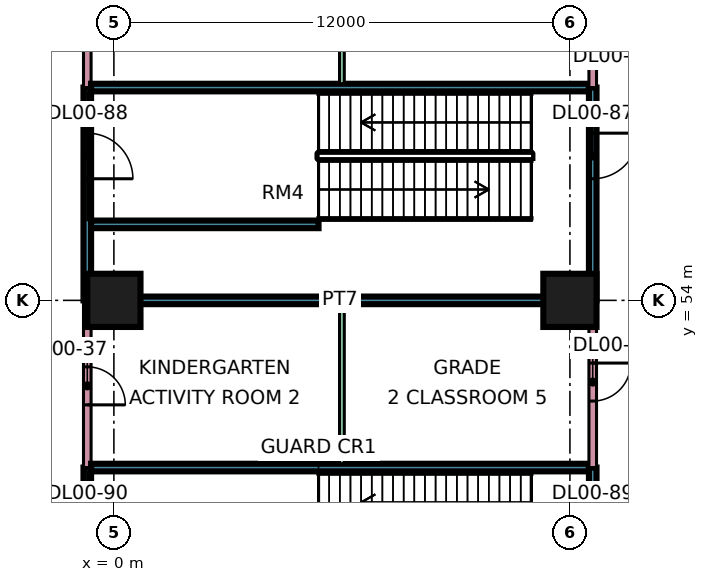
"""IFC4 building model, lengths in metres.
Left out: names, types, materials, properties, quantities, classifications, styles, units other than length and angle.
Written with IfcOpenShell. Run it as: python <this file> out.ifc"""

import sys

from ifc_helpers import new_model, si_unit, direction, frame, frame_2d, origin, origin_2d, place, context, subcontext, project, spatial, rectangle, extrude, element, fill, save


model = new_model("IFC4")
c1 = context("Model", 3, precision=1e-05, world=origin(), true_north=direction((0.0, 1.0)))
c2 = subcontext(c1, "Body", "Model", "MODEL_VIEW")
j1 = project(units=[si_unit("LENGTHUNIT", "METRE"), si_unit("PLANEANGLEUNIT", "RADIAN")], contexts=[c1])
p1 = place(None, origin())
s1 = spatial("IfcSite", under=j1, at=p1, CompositionType="ELEMENT")
p2 = place(p1, origin())
s2 = spatial("IfcBuilding", under=s1, at=p2, CompositionType="ELEMENT")
p3 = place(p2, origin())
s3 = spatial("IfcBuildingStorey", under=s2, at=p3, CompositionType="ELEMENT", Elevation=0.0)
for number, where, z_axis, x_axis in (
    (1, (0.0, 54.0, 0.0), (0.0, 0.0, 1.0), (1.0, 0.0, 0.0)),
    (2, (12.0, 54.0, 0.0), (0.0, 0.0, 1.0), (1.0, 0.0, 0.0)),
):
    element("IfcColumn", number, at=place(p3, frame(where, z_axis=z_axis, x_axis=x_axis)), inside=s3, PredefinedType="COLUMN", context=c2, shape_type="SweptSolid", body=[
        extrude(rectangle(XDim=1.4, YDim=1.4, at=origin_2d()), origin(), (0.0, 0.0, 1.0), 7.2),
    ])
p4 = place(p3, frame((-0.7, 45.0, 0.0), z_axis=(0.0, 0.0, 1.0), x_axis=(0.0, 1.0, 0.0)))
e3 = element("IfcWall", 3, at=p4, inside=s3, PredefinedType="SOLIDWALL", context=c2, shape_type="SweptSolid", body=[
    extrude(rectangle(XDim=4.6, YDim=0.2, at=frame_2d((2.3, 0.0))), origin(), (0.0, 0.0, 1.0), 6.8),
])
p5 = place(p4, frame((2.2, 0.0, 0.0)))
e4 = element("IfcOpeningElement", 4, at=p5, cuts=e3, PredefinedType="OPENING", context=c2, shape_type="SweptSolid", body=[
    extrude(rectangle(XDim=1.2, YDim=2.1, at=frame_2d((0.6, 1.05))), frame((0.0, 0.11, 0.0), z_axis=(0.0, -1.0, 0.0), x_axis=(1.0, 0.0, 0.0)), (0.0, 0.0, 1.0), 0.22),
])
p6 = place(p3, frame((-0.7, 49.6, 0.0), z_axis=(0.0, 0.0, 1.0), x_axis=(0.0, 1.0, 0.0)))
e5 = element("IfcWall", 5, at=p6, inside=s3, PredefinedType="PARTITIONING", context=c2, shape_type="SweptSolid", body=[
    extrude(rectangle(XDim=4.4, YDim=0.2, at=frame_2d((2.2, 0.0))), origin(), (0.0, 0.0, 1.0), 6.8),
])
p7 = place(p6, frame((1.65, 0.0, 0.0)))
e6 = element("IfcOpeningElement", 6, at=p7, cuts=e5, PredefinedType="OPENING", context=c2, shape_type="SweptSolid", body=[
    extrude(rectangle(XDim=1.0, YDim=2.1, at=frame_2d((0.5, 1.05))), frame((0.0, 0.11, 0.0), z_axis=(0.0, -1.0, 0.0), x_axis=(1.0, 0.0, 0.0)), (0.0, 0.0, 1.0), 0.22),
])
p8 = place(p3, frame((-0.7, 54.0, 0.0), z_axis=(0.0, 0.0, 1.0), x_axis=(0.0, 1.0, 0.0)))
e7 = element("IfcWall", 7, at=p8, inside=s3, PredefinedType="SOLIDWALL", context=c2, shape_type="SweptSolid", body=[
    extrude(rectangle(XDim=5.6, YDim=0.2, at=frame_2d((2.8, 0.0))), origin(), (0.0, 0.0, 1.0), 6.8),
])
p9 = place(p8, frame((3.2, 0.0, 0.0)))
e8 = element("IfcOpeningElement", 8, at=p9, cuts=e7, PredefinedType="OPENING", context=c2, shape_type="SweptSolid", body=[
    extrude(rectangle(XDim=1.2, YDim=2.1, at=frame_2d((0.6, 1.05))), frame((0.0, 0.11, 0.0), z_axis=(0.0, -1.0, 0.0), x_axis=(1.0, 0.0, 0.0)), (0.0, 0.0, 1.0), 0.22),
])
p10 = place(p3, frame((-0.7, 59.6, 0.0), z_axis=(0.0, 0.0, 1.0), x_axis=(0.0, 1.0, 0.0)))
e9 = element("IfcWall", 9, at=p10, inside=s3, PredefinedType="PARTITIONING", context=c2, shape_type="SweptSolid", body=[
    extrude(rectangle(XDim=6.4, YDim=0.2, at=frame_2d((3.2, 0.0))), origin(), (0.0, 0.0, 1.0), 6.8),
])
for number, where, z_axis, x_axis in (
    (10, (-0.6, 49.6, 0.0), (0.0, 0.0, 1.0), (1.0, 0.0, 0.0)),
    (11, (-0.6, 54.0, 0.0), (0.0, 0.0, 1.0), (1.0, 0.0, 0.0)),
    (12, (-0.6, 59.6, 0.0), (0.0, 0.0, 1.0), (1.0, 0.0, 0.0)),
):
    element("IfcWall", number, at=place(p3, frame(where, z_axis=z_axis, x_axis=x_axis)), inside=s3, PredefinedType="SOLIDWALL", context=c2, shape_type="SweptSolid", body=[
        extrude(rectangle(XDim=13.1, YDim=0.2, at=frame_2d((6.55, 0.0))), origin(), (0.0, 0.0, 1.0), 6.8),
    ])
p11 = place(p3, frame((6.0, 49.7, 0.0), z_axis=(0.0, 0.0, 1.0), x_axis=(0.0, 1.0, 0.0)))
e13 = element("IfcWall", 13, at=p11, inside=s3, PredefinedType="PARTITIONING", context=c2, shape_type="SweptSolid", body=[
    extrude(rectangle(XDim=4.2, YDim=0.125, at=frame_2d((2.1, 0.0))), origin(), (0.0, 0.0, 1.0), 6.8),
])
p12 = place(p3, frame((6.0, 59.7, 0.0), z_axis=(0.0, 0.0, 1.0), x_axis=(0.0, 1.0, 0.0)))
e14 = element("IfcWall", 14, at=p12, inside=s3, PredefinedType="PARTITIONING", context=c2, shape_type="SweptSolid", body=[
    extrude(rectangle(XDim=3.238, YDim=0.125, at=frame_2d((1.619, 0.0))), origin(), (0.0, 0.0, 1.0), 6.8),
])
p13 = place(p3, frame((12.6, 45.0, 0.0), z_axis=(0.0, 0.0, 1.0), x_axis=(0.0, 1.0, 0.0)))
e15 = element("IfcWall", 15, at=p13, inside=s3, PredefinedType="SOLIDWALL", context=c2, shape_type="SweptSolid", body=[
    extrude(rectangle(XDim=4.6, YDim=0.2, at=frame_2d((2.3, 0.0))), origin(), (0.0, 0.0, 1.0), 6.8),
])
p14 = place(p13, frame((2.2, 0.0, 0.0)))
e16 = element("IfcOpeningElement", 16, at=p14, cuts=e15, PredefinedType="OPENING", context=c2, shape_type="SweptSolid", body=[
    extrude(rectangle(XDim=1.2, YDim=2.1, at=frame_2d((0.6, 1.05))), frame((0.0, 0.11, 0.0), z_axis=(0.0, -1.0, 0.0), x_axis=(1.0, 0.0, 0.0)), (0.0, 0.0, 1.0), 0.22),
])
p15 = place(p3, frame((12.6, 49.6, 0.0), z_axis=(0.0, 0.0, 1.0), x_axis=(0.0, 1.0, 0.0)))
e17 = element("IfcWall", 17, at=p15, inside=s3, PredefinedType="PARTITIONING", context=c2, shape_type="SweptSolid", body=[
    extrude(rectangle(XDim=4.4, YDim=0.2, at=frame_2d((2.2, 0.0))), origin(), (0.0, 0.0, 1.0), 6.8),
])
p16 = place(p15, frame((1.75, 0.0, 0.0)))
e18 = element("IfcOpeningElement", 18, at=p16, cuts=e17, PredefinedType="OPENING", context=c2, shape_type="SweptSolid", body=[
    extrude(rectangle(XDim=1.0, YDim=2.1, at=frame_2d((0.5, 1.05))), frame((0.0, 0.11, 0.0), z_axis=(0.0, -1.0, 0.0), x_axis=(1.0, 0.0, 0.0)), (0.0, 0.0, 1.0), 0.22),
])
p17 = place(p3, frame((12.6, 54.0, 0.0), z_axis=(0.0, 0.0, 1.0), x_axis=(0.0, 1.0, 0.0)))
e19 = element("IfcWall", 19, at=p17, inside=s3, PredefinedType="SOLIDWALL", context=c2, shape_type="SweptSolid", body=[
    extrude(rectangle(XDim=5.6, YDim=0.2, at=frame_2d((2.8, 0.0))), origin(), (0.0, 0.0, 1.0), 6.8),
])
p18 = place(p17, frame((3.2, 0.0, 0.0)))
e20 = element("IfcOpeningElement", 20, at=p18, cuts=e19, PredefinedType="OPENING", context=c2, shape_type="SweptSolid", body=[
    extrude(rectangle(XDim=1.2, YDim=2.1, at=frame_2d((0.6, 1.05))), frame((0.0, 0.11, 0.0), z_axis=(0.0, -1.0, 0.0), x_axis=(1.0, 0.0, 0.0)), (0.0, 0.0, 1.0), 0.22),
])
p19 = place(p3, frame((12.6, 59.6, 0.0), z_axis=(0.0, 0.0, 1.0), x_axis=(0.0, 1.0, 0.0)))
e21 = element("IfcWall", 21, at=p19, inside=s3, PredefinedType="PARTITIONING", context=c2, shape_type="SweptSolid", body=[
    extrude(rectangle(XDim=4.0, YDim=0.2, at=frame_2d((2.0, 0.0))), origin(), (0.0, 0.0, 1.0), 6.8),
])
p20 = place(p19, frame((1.25, 0.0, 0.0)))
e22 = element("IfcOpeningElement", 22, at=p20, cuts=e21, PredefinedType="OPENING", context=c2, shape_type="SweptSolid", body=[
    extrude(rectangle(XDim=1.0, YDim=2.1, at=frame_2d((0.5, 1.05))), frame((0.0, 0.11, 0.0), z_axis=(0.0, -1.0, 0.0), x_axis=(1.0, 0.0, 0.0)), (0.0, 0.0, 1.0), 0.22),
])
p21 = place(p3, frame((-0.6, 56.0, 0.0), z_axis=(0.0, 0.0, 1.0), x_axis=(1.0, 0.0, 0.0)))
e23 = element("IfcWall", 23, at=p21, inside=s3, PredefinedType="SOLIDWALL", context=c2, shape_type="SweptSolid", body=[
    extrude(rectangle(XDim=5.985, YDim=0.2, at=frame_2d((2.993, 0.0))), origin(), (0.0, 0.0, 1.0), 6.8),
])
p22 = place(p16, origin())
e24 = element("IfcDoor", 24, at=p22, inside=s3, OperationType="SINGLE_SWING_RIGHT", PredefinedType="DOOR", context=c2, shape_type="SweptSolid", body=[
    extrude(rectangle(XDim=1.0, YDim=2.1, at=frame_2d((0.5, 1.05))), frame((0.0, 0.025, 0.0), z_axis=(0.0, -1.0, 0.0), x_axis=(1.0, 0.0, 0.0)), (0.0, 0.0, 1.0), 0.05),
])
fill(e18, e24)
p23 = place(p7, frame((1.0, 0.0, 0.0), z_axis=(0.0, 0.0, 1.0), x_axis=(-1.0, 0.0, 0.0)))
e25 = element("IfcDoor", 25, at=p23, inside=s3, OperationType="SINGLE_SWING_LEFT", PredefinedType="DOOR", context=c2, shape_type="SweptSolid", body=[
    extrude(rectangle(XDim=1.0, YDim=2.1, at=frame_2d((0.5, 1.05))), frame((0.0, 0.025, 0.0), z_axis=(0.0, -1.0, 0.0), x_axis=(1.0, 0.0, 0.0)), (0.0, 0.0, 1.0), 0.05),
])
fill(e6, e25)
p24 = place(p18, origin())
e26 = element("IfcDoor", 26, at=p24, inside=s3, OperationType="SINGLE_SWING_RIGHT", PredefinedType="DOOR", context=c2, shape_type="SweptSolid", body=[
    extrude(rectangle(XDim=1.2, YDim=2.1, at=frame_2d((0.6, 1.05))), frame((0.0, 0.025, 0.0), z_axis=(0.0, -1.0, 0.0), x_axis=(1.0, 0.0, 0.0)), (0.0, 0.0, 1.0), 0.05),
])
fill(e20, e26)
p25 = place(p9, frame((1.2, 0.0, 0.0), z_axis=(0.0, 0.0, 1.0), x_axis=(-1.0, 0.0, 0.0)))
e27 = element("IfcDoor", 27, at=p25, inside=s3, OperationType="SINGLE_SWING_LEFT", PredefinedType="DOOR", context=c2, shape_type="SweptSolid", body=[
    extrude(rectangle(XDim=1.2, YDim=2.1, at=frame_2d((0.6, 1.05))), frame((0.0, 0.025, 0.0), z_axis=(0.0, -1.0, 0.0), x_axis=(1.0, 0.0, 0.0)), (0.0, 0.0, 1.0), 0.05),
])
fill(e8, e27)
save(model, sys.argv[1])
